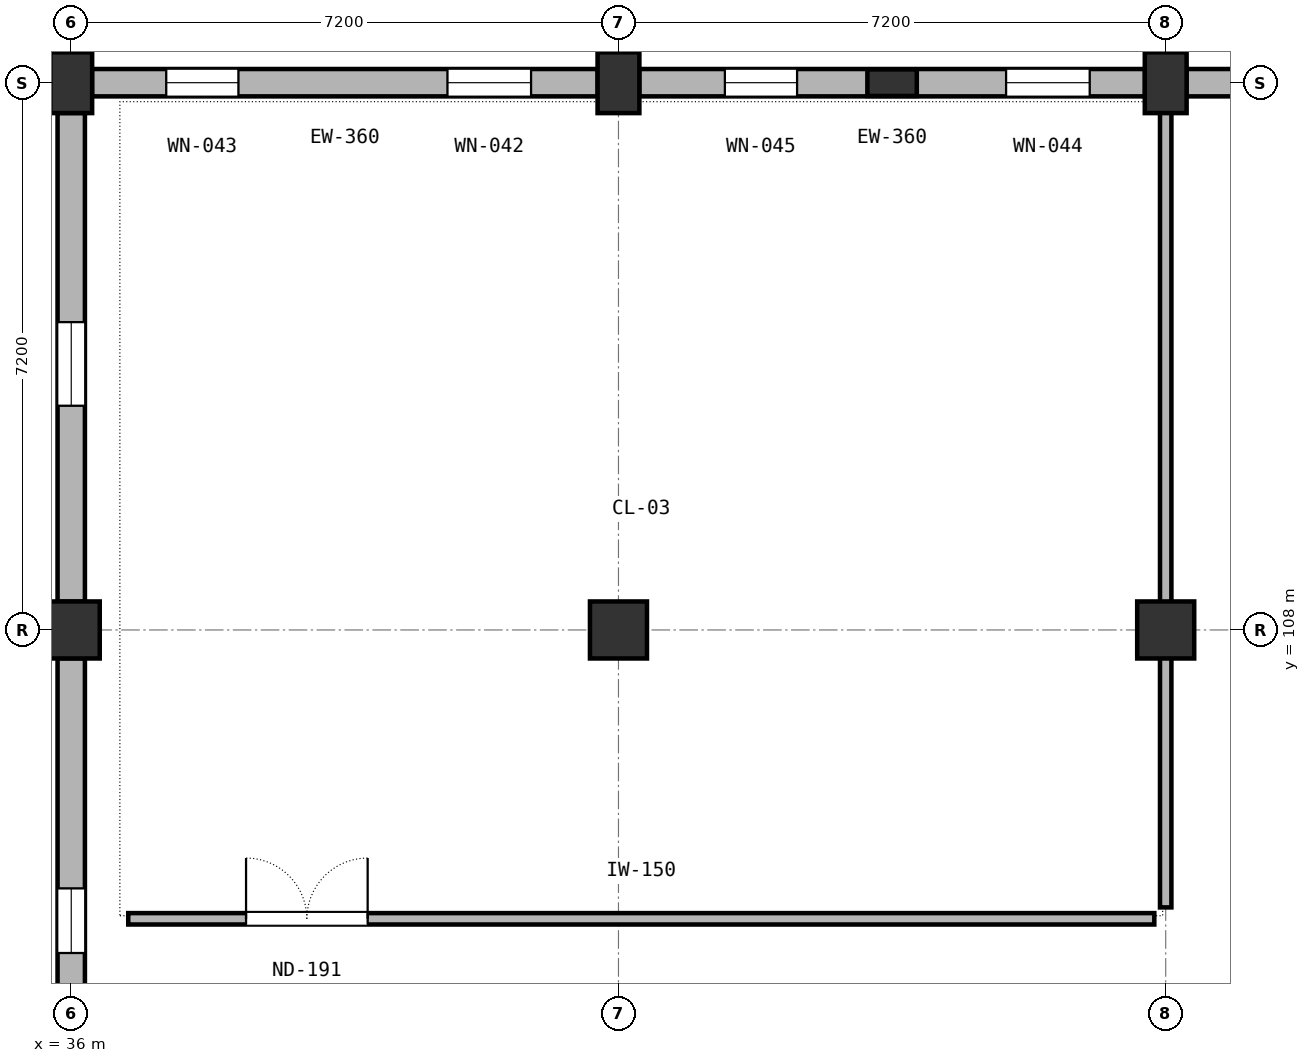
"""IFC4 building model, lengths in metres.
Left out: names, types, materials, properties, quantities, classifications, styles, units other than length and angle.
Written with IfcOpenShell. Run it as: python <this file> out.ifc"""

import sys

from ifc_helpers import new_model, si_unit, direction, frame, frame_2d, origin, origin_2d, place, context, subcontext, project, spatial, rectangle, extrude, element, fill, save


model = new_model("IFC4")
c1 = context("Model", 3, precision=1e-05, world=origin(), true_north=direction((0.0, 1.0)))
c2 = subcontext(c1, "Body", "Model", "MODEL_VIEW")
j1 = project(units=[si_unit("LENGTHUNIT", "METRE"), si_unit("PLANEANGLEUNIT", "RADIAN")], contexts=[c1])
p1 = place(None, origin())
s1 = spatial("IfcSite", under=j1, at=p1, CompositionType="ELEMENT")
p2 = place(p1, origin())
s2 = spatial("IfcBuilding", under=s1, at=p2, CompositionType="ELEMENT")
p3 = place(p2, frame((0.0, 0.0, 10.2)))
s3 = spatial("IfcBuildingStorey", under=s2, at=p3, CompositionType="ELEMENT", Elevation=10.2)
p4 = place(p3, frame((36.0, 108.0, 0.0), z_axis=(0.0, 0.0, 1.0), x_axis=(1.0, 0.0, 0.0)))
e1 = element("IfcColumn", 1, at=p4, inside=s3, PredefinedType="COLUMN", context=c2, shape_type="SweptSolid", body=[
    extrude(rectangle(XDim=0.75, YDim=0.75, at=origin_2d()), origin(), (0.0, 0.0, 1.0), 4.2),
])
p5 = place(p3, frame((36.0, 115.2, 0.0), z_axis=(0.0, 0.0, 1.0), x_axis=(1.0, 0.0, 0.0)))
e2 = element("IfcColumn", 2, at=p5, inside=s3, PredefinedType="COLUMN", context=c2, shape_type="SweptSolid", body=[
    extrude(rectangle(XDim=0.55, YDim=0.8, at=origin_2d()), origin(), (0.0, 0.0, 1.0), 4.2),
])
p6 = place(p3, frame((43.2, 108.0, 0.0), z_axis=(0.0, 0.0, 1.0), x_axis=(1.0, 0.0, 0.0)))
e3 = element("IfcColumn", 3, at=p6, inside=s3, PredefinedType="COLUMN", context=c2, shape_type="SweptSolid", body=[
    extrude(rectangle(XDim=0.75, YDim=0.75, at=origin_2d()), origin(), (0.0, 0.0, 1.0), 4.2),
])
p7 = place(p3, frame((43.2, 115.2, 0.0), z_axis=(0.0, 0.0, 1.0), x_axis=(1.0, 0.0, 0.0)))
e4 = element("IfcColumn", 4, at=p7, inside=s3, PredefinedType="COLUMN", context=c2, shape_type="SweptSolid", body=[
    extrude(rectangle(XDim=0.55, YDim=0.8, at=origin_2d()), origin(), (0.0, 0.0, 1.0), 4.2),
])
p8 = place(p3, frame((50.4, 108.0, 0.0), z_axis=(0.0, 0.0, 1.0), x_axis=(1.0, 0.0, 0.0)))
e5 = element("IfcColumn", 5, at=p8, inside=s3, PredefinedType="COLUMN", context=c2, shape_type="SweptSolid", body=[
    extrude(rectangle(XDim=0.75, YDim=0.75, at=origin_2d()), origin(), (0.0, 0.0, 1.0), 4.2),
])
p9 = place(p3, frame((50.4, 115.2, 0.0), z_axis=(0.0, 0.0, 1.0), x_axis=(1.0, 0.0, 0.0)))
e6 = element("IfcColumn", 6, at=p9, inside=s3, PredefinedType="COLUMN", context=c2, shape_type="SweptSolid", body=[
    extrude(rectangle(XDim=0.55, YDim=0.8, at=origin_2d()), origin(), (0.0, 0.0, 1.0), 4.2),
])
p10 = place(p3, frame((46.8, 115.2, 0.0), z_axis=(0.0, 0.0, 1.0), x_axis=(1.0, 0.0, 0.0)))
e7 = element("IfcColumn", 7, at=p10, inside=s3, PredefinedType="PILASTER", context=c2, shape_type="SweptSolid", body=[
    extrude(rectangle(XDim=0.65, YDim=0.35, at=origin_2d()), origin(), (0.0, 0.0, 1.0), 4.2),
])
p11 = place(p3, frame((42.927, 115.2, 0.0), z_axis=(0.0, 0.0, 1.0), x_axis=(-1.0, 0.0, 0.0)))
e8 = element("IfcWall", 8, at=p11, inside=s3, PredefinedType="SOLIDWALL", context=c2, shape_type="SweptSolid", body=[
    extrude(rectangle(XDim=6.654, YDim=0.36, at=frame_2d((3.327, 0.0))), origin(), (0.0, 0.0, 1.0), 3.04),
])
p12 = place(p11, frame((0.877, 0.0, 0.7)))
e9 = element("IfcOpeningElement", 9, at=p12, cuts=e8, PredefinedType="OPENING", context=c2, shape_type="SweptSolid", body=[
    extrude(rectangle(XDim=1.1, YDim=2.14, at=frame_2d((0.55, 1.07))), frame((0.0, 0.19, 0.0), z_axis=(0.0, -1.0, 0.0), x_axis=(1.0, 0.0, 0.0)), (0.0, 0.0, 1.0), 0.38),
])
p13 = place(p11, frame((4.727, 0.0, 0.7)))
e10 = element("IfcOpeningElement", 10, at=p13, cuts=e8, PredefinedType="OPENING", context=c2, shape_type="SweptSolid", body=[
    extrude(rectangle(XDim=0.95, YDim=2.14, at=frame_2d((0.475, 1.07))), frame((0.0, 0.19, 0.0), z_axis=(0.0, -1.0, 0.0), x_axis=(1.0, 0.0, 0.0)), (0.0, 0.0, 1.0), 0.38),
])
p14 = place(p3, frame((50.127, 115.2, 0.0), z_axis=(0.0, 0.0, 1.0), x_axis=(-1.0, 0.0, 0.0)))
e11 = element("IfcWall", 11, at=p14, inside=s3, PredefinedType="SOLIDWALL", context=c2, shape_type="SweptSolid", body=[
    extrude(rectangle(XDim=6.654, YDim=0.36, at=frame_2d((3.327, 0.0))), origin(), (0.0, 0.0, 1.0), 3.04),
])
p15 = place(p14, frame((0.727, 0.0, 0.7)))
e12 = element("IfcOpeningElement", 12, at=p15, cuts=e11, PredefinedType="OPENING", context=c2, shape_type="SweptSolid", body=[
    extrude(rectangle(XDim=1.1, YDim=2.14, at=frame_2d((0.55, 1.07))), frame((0.0, 0.19, 0.0), z_axis=(0.0, -1.0, 0.0), x_axis=(1.0, 0.0, 0.0)), (0.0, 0.0, 1.0), 0.38),
])
p16 = place(p14, frame((4.577, 0.0, 0.7)))
e13 = element("IfcOpeningElement", 13, at=p16, cuts=e11, PredefinedType="OPENING", context=c2, shape_type="SweptSolid", body=[
    extrude(rectangle(XDim=0.95, YDim=2.14, at=frame_2d((0.475, 1.07))), frame((0.0, 0.19, 0.0), z_axis=(0.0, -1.0, 0.0), x_axis=(1.0, 0.0, 0.0)), (0.0, 0.0, 1.0), 0.38),
])
p17 = place(p3, frame((57.327, 115.2, 0.0), z_axis=(0.0, 0.0, 1.0), x_axis=(-1.0, 0.0, 0.0)))
e14 = element("IfcWall", 14, at=p17, inside=s3, PredefinedType="SOLIDWALL", context=c2, shape_type="SweptSolid", body=[
    extrude(rectangle(XDim=6.654, YDim=0.36, at=frame_2d((3.327, 0.0))), origin(), (0.0, 0.0, 1.0), 3.04),
])
p18 = place(p17, frame((0.877, 0.0, 0.7)))
e15 = element("IfcOpeningElement", 15, at=p18, cuts=e14, PredefinedType="OPENING", context=c2, shape_type="SweptSolid", body=[
    extrude(rectangle(XDim=1.1, YDim=2.14, at=frame_2d((0.55, 1.07))), frame((0.0, 0.19, 0.0), z_axis=(0.0, -1.0, 0.0), x_axis=(1.0, 0.0, 0.0)), (0.0, 0.0, 1.0), 0.38),
])
p19 = place(p17, frame((4.727, 0.0, 0.7)))
e16 = element("IfcOpeningElement", 16, at=p19, cuts=e14, PredefinedType="OPENING", context=c2, shape_type="SweptSolid", body=[
    extrude(rectangle(XDim=0.95, YDim=2.14, at=frame_2d((0.475, 1.07))), frame((0.0, 0.19, 0.0), z_axis=(0.0, -1.0, 0.0), x_axis=(1.0, 0.0, 0.0)), (0.0, 0.0, 1.0), 0.38),
])
p20 = place(p3, frame((36.0, 101.173, 0.0), z_axis=(0.0, 0.0, 1.0), x_axis=(0.0, 1.0, 0.0)))
e17 = element("IfcWall", 17, at=p20, inside=s3, PredefinedType="SOLIDWALL", context=c2, shape_type="SweptSolid", body=[
    extrude(rectangle(XDim=6.454, YDim=0.36, at=frame_2d((3.227, 0.0))), origin(), (0.0, 0.0, 1.0), 3.04),
])
p21 = place(p20, frame((2.577, 0.0, 0.7)))
e18 = element("IfcOpeningElement", 18, at=p21, cuts=e17, PredefinedType="OPENING", context=c2, shape_type="SweptSolid", body=[
    extrude(rectangle(XDim=0.85, YDim=2.19, at=frame_2d((0.425, 1.095))), frame((0.0, 0.19, 0.0), z_axis=(0.0, -1.0, 0.0), x_axis=(1.0, 0.0, 0.0)), (0.0, 0.0, 1.0), 0.38),
])
p22 = place(p3, frame((36.0, 108.373, 0.0), z_axis=(0.0, 0.0, 1.0), x_axis=(0.0, 1.0, 0.0)))
e19 = element("IfcWall", 19, at=p22, inside=s3, PredefinedType="SOLIDWALL", context=c2, shape_type="SweptSolid", body=[
    extrude(rectangle(XDim=6.429, YDim=0.36, at=frame_2d((3.214, 0.0))), origin(), (0.0, 0.0, 1.0), 3.04),
])
p23 = place(p22, frame((2.577, 0.0, 0.7)))
e20 = element("IfcOpeningElement", 20, at=p23, cuts=e19, PredefinedType="OPENING", context=c2, shape_type="SweptSolid", body=[
    extrude(rectangle(XDim=1.1, YDim=2.19, at=frame_2d((0.55, 1.095))), frame((0.0, 0.19, 0.0), z_axis=(0.0, -1.0, 0.0), x_axis=(1.0, 0.0, 0.0)), (0.0, 0.0, 1.0), 0.38),
])
p24 = place(p3, frame((36.75, 104.2, 0.0), z_axis=(0.0, 0.0, 1.0), x_axis=(1.0, 0.0, 0.0)))
e21 = element("IfcWall", 21, at=p24, inside=s3, PredefinedType="PARTITIONING", context=c2, shape_type="SweptSolid", body=[
    extrude(rectangle(XDim=13.5, YDim=0.15, at=frame_2d((6.75, 0.0))), origin(), (0.0, 0.0, 1.0), 3.08),
])
p25 = place(p24, frame((1.55, 0.0, 0.0)))
e22 = element("IfcOpeningElement", 22, at=p25, cuts=e21, PredefinedType="OPENING", context=c2, shape_type="SweptSolid", body=[
    extrude(rectangle(XDim=1.6, YDim=2.2, at=frame_2d((0.8, 1.1))), frame((0.0, 0.085, 0.0), z_axis=(0.0, -1.0, 0.0), x_axis=(1.0, 0.0, 0.0)), (0.0, 0.0, 1.0), 0.17),
])
p26 = place(p3, frame((50.4, 104.35, 0.0), z_axis=(0.0, 0.0, 1.0), x_axis=(0.0, 1.0, 0.0)))
e23 = element("IfcWall", 23, at=p26, inside=s3, PredefinedType="PARTITIONING", context=c2, shape_type="SweptSolid", body=[
    extrude(rectangle(XDim=10.67, YDim=0.15, at=frame_2d((5.335, 0.0))), origin(), (0.0, 0.0, 1.0), 3.08),
])
p27 = place(p12, origin())
e24 = element("IfcWindow", 24, at=p27, inside=s3, PartitioningType="SINGLE_PANEL", PredefinedType="WINDOW", context=c2, shape_type="SweptSolid", body=[
    extrude(rectangle(XDim=1.1, YDim=2.14, at=frame_2d((0.55, 1.07))), frame((0.0, 0.03, 0.0), z_axis=(0.0, -1.0, 0.0), x_axis=(1.0, 0.0, 0.0)), (0.0, 0.0, 1.0), 0.06),
])
fill(e9, e24)
p28 = place(p13, origin())
e25 = element("IfcWindow", 25, at=p28, inside=s3, PartitioningType="SINGLE_PANEL", PredefinedType="WINDOW", context=c2, shape_type="SweptSolid", body=[
    extrude(rectangle(XDim=0.95, YDim=2.14, at=frame_2d((0.475, 1.07))), frame((0.0, 0.03, 0.0), z_axis=(0.0, -1.0, 0.0), x_axis=(1.0, 0.0, 0.0)), (0.0, 0.0, 1.0), 0.06),
])
fill(e10, e25)
p29 = place(p15, origin())
e26 = element("IfcWindow", 26, at=p29, inside=s3, PartitioningType="SINGLE_PANEL", PredefinedType="WINDOW", context=c2, shape_type="SweptSolid", body=[
    extrude(rectangle(XDim=1.1, YDim=2.14, at=frame_2d((0.55, 1.07))), frame((0.0, 0.03, 0.0), z_axis=(0.0, -1.0, 0.0), x_axis=(1.0, 0.0, 0.0)), (0.0, 0.0, 1.0), 0.06),
])
fill(e12, e26)
p30 = place(p16, origin())
e27 = element("IfcWindow", 27, at=p30, inside=s3, PartitioningType="SINGLE_PANEL", PredefinedType="WINDOW", context=c2, shape_type="SweptSolid", body=[
    extrude(rectangle(XDim=0.95, YDim=2.14, at=frame_2d((0.475, 1.07))), frame((0.0, 0.03, 0.0), z_axis=(0.0, -1.0, 0.0), x_axis=(1.0, 0.0, 0.0)), (0.0, 0.0, 1.0), 0.06),
])
fill(e13, e27)
p31 = place(p21, origin())
e28 = element("IfcWindow", 28, at=p31, inside=s3, PartitioningType="SINGLE_PANEL", PredefinedType="WINDOW", context=c2, shape_type="SweptSolid", body=[
    extrude(rectangle(XDim=0.85, YDim=2.19, at=frame_2d((0.425, 1.095))), frame((0.0, 0.03, 0.0), z_axis=(0.0, -1.0, 0.0), x_axis=(1.0, 0.0, 0.0)), (0.0, 0.0, 1.0), 0.06),
])
fill(e18, e28)
p32 = place(p23, origin())
e29 = element("IfcWindow", 29, at=p32, inside=s3, PartitioningType="SINGLE_PANEL", PredefinedType="WINDOW", context=c2, shape_type="SweptSolid", body=[
    extrude(rectangle(XDim=1.1, YDim=2.19, at=frame_2d((0.55, 1.095))), frame((0.0, 0.03, 0.0), z_axis=(0.0, -1.0, 0.0), x_axis=(1.0, 0.0, 0.0)), (0.0, 0.0, 1.0), 0.06),
])
fill(e20, e29)
p33 = place(p25, origin())
e30 = element("IfcDoor", 30, at=p33, inside=s3, OperationType="DOUBLE_DOOR_SINGLE_SWING", PredefinedType="DOOR", context=c2, shape_type="SweptSolid", body=[
    extrude(rectangle(XDim=1.6, YDim=2.2, at=frame_2d((0.8, 1.1))), frame((0.0, 0.025, 0.0), z_axis=(0.0, -1.0, 0.0), x_axis=(1.0, 0.0, 0.0)), (0.0, 0.0, 1.0), 0.05),
])
fill(e22, e30)
save(model, sys.argv[1])
